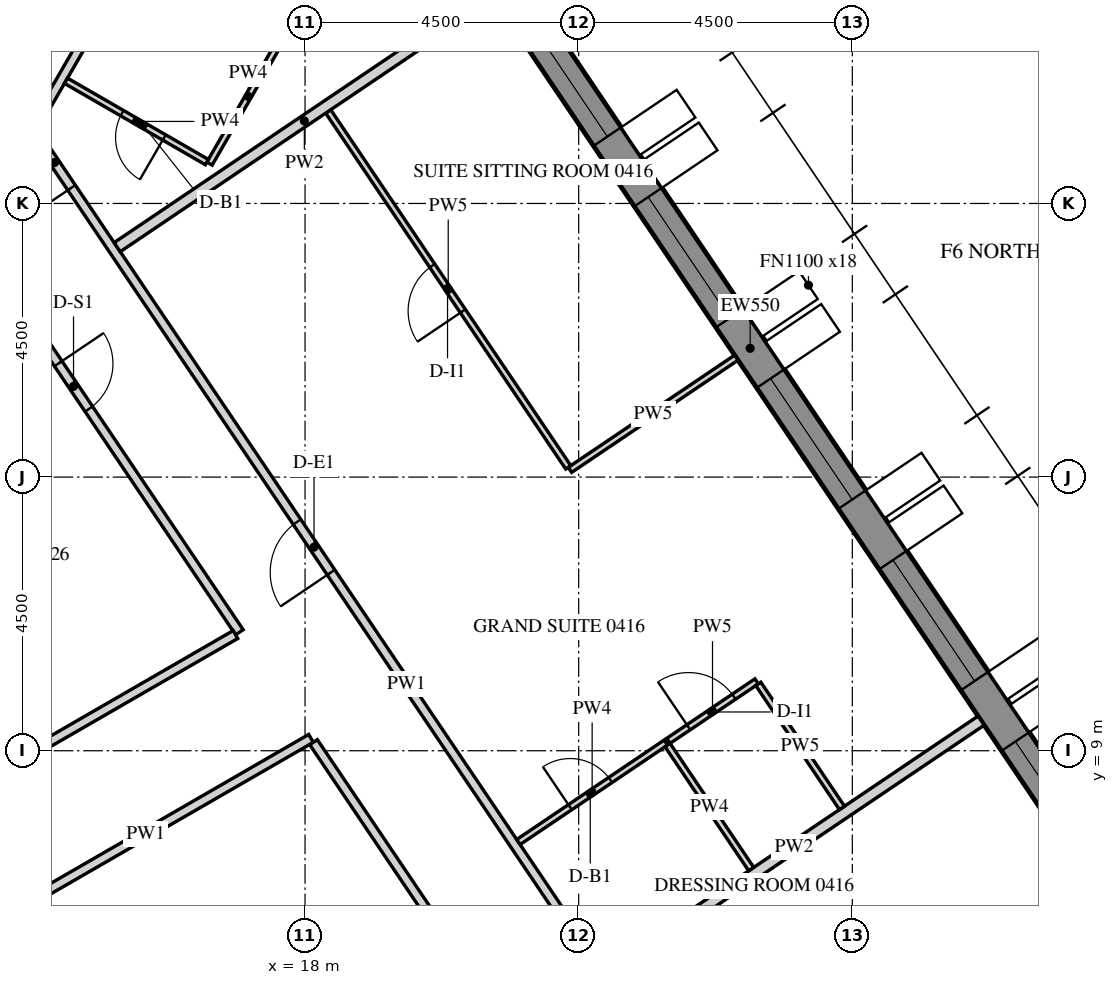
"""IFC4 building model, lengths in metres.
Left out: names, types, materials, properties, quantities, classifications, styles, units other than length and angle.
Written with IfcOpenShell. Run it as: python <this file> out.ifc"""

import sys

from ifc_helpers import new_model, si_unit, direction, frame, frame_2d, origin, place, context, subcontext, project, spatial, polyline, rectangle, outline, extrude, element, fill, save


model = new_model("IFC4")
c1 = context("Model", 3, precision=1e-05, world=origin(), true_north=direction((0.0, 1.0)))
c2 = subcontext(c1, "Body", "Model", "MODEL_VIEW")
j1 = project(units=[si_unit("LENGTHUNIT", "METRE"), si_unit("PLANEANGLEUNIT", "RADIAN")], contexts=[c1])
p1 = place(None, origin())
s1 = spatial("IfcSite", under=j1, at=p1, CompositionType="ELEMENT")
p2 = place(p1, origin())
s2 = spatial("IfcBuilding", under=s1, at=p2, CompositionType="ELEMENT")
p3 = place(p2, frame((0.0, 0.0, 68.7)))
s3 = spatial("IfcBuildingStorey", under=s2, at=p3, CompositionType="ELEMENT", Elevation=68.7)
p4 = place(p3, frame((33.728, 3.153, -0.15), z_axis=(0.0, 0.0, 1.0), x_axis=(-0.559192411416, 0.82903790445, 0.0)))
e1 = element("IfcWall", 1, at=p4, inside=s3, PredefinedType="SOLIDWALL", context=c2, shape_type="SweptSolid", body=[
    extrude(outline(polyline([(-0.026, -0.275), (30.093, -0.275), (30.048, 0.275), (0.026, 0.275), (-0.026, -0.275)])), origin(), (0.0, 0.0, 1.0), 3.9),
])
p5 = place(p4, frame((1.236, 0.0, 1.05)))
e2 = element("IfcOpeningElement", 2, at=p5, cuts=e1, PredefinedType="OPENING", context=c2, shape_type="SweptSolid", body=[
    extrude(rectangle(XDim=2.4, YDim=2.4, at=frame_2d((1.2, 1.2))), frame((0.0, 0.285, 0.0), z_axis=(0.0, -1.0, 0.0), x_axis=(1.0, 0.0, 0.0)), (0.0, 0.0, 1.0), 0.57),
])
p6 = place(p4, frame((4.835, 0.0, 1.05)))
e3 = element("IfcOpeningElement", 3, at=p6, cuts=e1, PredefinedType="OPENING", context=c2, shape_type="SweptSolid", body=[
    extrude(rectangle(XDim=2.4, YDim=2.4, at=frame_2d((1.2, 1.2))), frame((0.0, 0.285, 0.0), z_axis=(0.0, -1.0, 0.0), x_axis=(1.0, 0.0, 0.0)), (0.0, 0.0, 1.0), 0.57),
])
p7 = place(p4, frame((8.436, 0.0, 1.05)))
e4 = element("IfcOpeningElement", 4, at=p7, cuts=e1, PredefinedType="OPENING", context=c2, shape_type="SweptSolid", body=[
    extrude(rectangle(XDim=2.4, YDim=2.4, at=frame_2d((1.2, 1.2))), frame((0.0, 0.285, 0.0), z_axis=(0.0, -1.0, 0.0), x_axis=(1.0, 0.0, 0.0)), (0.0, 0.0, 1.0), 0.57),
])
p8 = place(p4, frame((12.035, 0.0, 1.05)))
e5 = element("IfcOpeningElement", 5, at=p8, cuts=e1, PredefinedType="OPENING", context=c2, shape_type="SweptSolid", body=[
    extrude(rectangle(XDim=2.4, YDim=2.4, at=frame_2d((1.2, 1.2))), frame((0.0, 0.285, 0.0), z_axis=(0.0, -1.0, 0.0), x_axis=(1.0, 0.0, 0.0)), (0.0, 0.0, 1.0), 0.57),
])
p9 = place(p4, frame((15.635, 0.0, 1.05)))
e6 = element("IfcOpeningElement", 6, at=p9, cuts=e1, PredefinedType="OPENING", context=c2, shape_type="SweptSolid", body=[
    extrude(rectangle(XDim=2.4, YDim=2.4, at=frame_2d((1.2, 1.2))), frame((0.0, 0.285, 0.0), z_axis=(0.0, -1.0, 0.0), x_axis=(1.0, 0.0, 0.0)), (0.0, 0.0, 1.0), 0.57),
])
p10 = place(p4, frame((19.236, 0.0, 1.05)))
e7 = element("IfcOpeningElement", 7, at=p10, cuts=e1, PredefinedType="OPENING", context=c2, shape_type="SweptSolid", body=[
    extrude(rectangle(XDim=2.4, YDim=2.4, at=frame_2d((1.2, 1.2))), frame((0.0, 0.285, 0.0), z_axis=(0.0, -1.0, 0.0), x_axis=(1.0, 0.0, 0.0)), (0.0, 0.0, 1.0), 0.57),
])
p11 = place(p4, frame((22.835, 0.0, 1.05)))
e8 = element("IfcOpeningElement", 8, at=p11, cuts=e1, PredefinedType="OPENING", context=c2, shape_type="SweptSolid", body=[
    extrude(rectangle(XDim=2.4, YDim=2.4, at=frame_2d((1.2, 1.2))), frame((0.0, 0.285, 0.0), z_axis=(0.0, -1.0, 0.0), x_axis=(1.0, 0.0, 0.0)), (0.0, 0.0, 1.0), 0.57),
])
p12 = place(p4, frame((26.436, 0.0, 1.05)))
e9 = element("IfcOpeningElement", 9, at=p12, cuts=e1, PredefinedType="OPENING", context=c2, shape_type="SweptSolid", body=[
    extrude(rectangle(XDim=2.4, YDim=2.4, at=frame_2d((1.2, 1.2))), frame((0.0, 0.285, 0.0), z_axis=(0.0, -1.0, 0.0), x_axis=(1.0, 0.0, 0.0)), (0.0, 0.0, 1.0), 0.57),
])
p13 = place(p3, frame((15.819, 0.0, -0.15), z_axis=(0.0, 0.0, 1.0), x_axis=(-0.499999880136, 0.866025472988, 0.0)))
e10 = element("IfcWall", 10, at=p13, inside=s3, PredefinedType="SHEAR", context=c2, shape_type="SweptSolid", body=[
    extrude(outline(polyline([(-0.173, -0.3), (15.993, -0.3), (15.646, 0.3), (0.173, 0.3), (-0.173, -0.3)])), origin(), (0.0, 0.0, 1.0), 3.9),
])
p14 = place(p13, frame((6.981, 0.0, 0.15)))
e11 = element("IfcOpeningElement", 11, at=p14, cuts=e10, PredefinedType="OPENING", context=c2, shape_type="SweptSolid", body=[
    extrude(rectangle(XDim=1.8, YDim=2.4, at=frame_2d((0.9, 1.2))), frame((0.0, 0.31, 0.0), z_axis=(0.0, -1.0, 0.0), x_axis=(1.0, 0.0, 0.0)), (0.0, 0.0, 1.0), 0.62),
])
p15 = place(p3, frame((8.083, 14.0, -0.15), z_axis=(0.0, 0.0, 1.0), x_axis=(0.499997680643, 0.866026742862, 0.0)))
e12 = element("IfcWall", 12, at=p15, inside=s3, PredefinedType="SHEAR", context=c2, shape_type="SweptSolid", body=[
    extrude(rectangle(XDim=16.509, YDim=0.6, at=frame_2d((8.254, 0.0))), origin(), (0.0, 0.0, 1.0), 3.9),
])
p16 = place(p15, frame((7.354, 0.0, 0.15)))
e13 = element("IfcOpeningElement", 13, at=p16, cuts=e12, PredefinedType="OPENING", context=c2, shape_type="SweptSolid", body=[
    extrude(rectangle(XDim=1.8, YDim=2.4, at=frame_2d((0.9, 1.2))), frame((0.0, 0.31, 0.0), z_axis=(0.0, -1.0, 0.0), x_axis=(1.0, 0.0, 0.0)), (0.0, 0.0, 1.0), 0.62),
])
p17 = place(p3, frame((25.821, 0.972, 0.0), z_axis=(0.0, 0.0, 1.0), x_axis=(-0.559193816298, 0.829036956845, 0.0)))
e14 = element("IfcWall", 14, at=p17, inside=s3, PredefinedType="PARTITIONING", context=c2, shape_type="SweptSolid", body=[
    extrude(rectangle(XDim=22.002, YDim=0.15, at=frame_2d((11.001, 0.0))), origin(), (0.0, 0.0, 1.0), 2.988),
])
p18 = place(p17, frame((3.269, 0.0, 0.0)))
e15 = element("IfcOpeningElement", 15, at=p18, cuts=e14, PredefinedType="OPENING", context=c2, shape_type="SweptSolid", body=[
    extrude(rectangle(XDim=1.0, YDim=2.1, at=frame_2d((0.5, 1.05))), frame((0.0, 0.085, 0.0), z_axis=(0.0, -1.0, 0.0), x_axis=(1.0, 0.0, 0.0)), (0.0, 0.0, 1.0), 0.17),
])
p19 = place(p17, frame((13.221, 0.0, 0.0)))
e16 = element("IfcOpeningElement", 16, at=p19, cuts=e14, PredefinedType="OPENING", context=c2, shape_type="SweptSolid", body=[
    extrude(rectangle(XDim=1.0, YDim=2.1, at=frame_2d((0.5, 1.05))), frame((0.0, 0.085, 0.0), z_axis=(0.0, -1.0, 0.0), x_axis=(1.0, 0.0, 0.0)), (0.0, 0.0, 1.0), 0.17),
])
p20 = place(p17, frame((20.852, 0.0, 0.0)))
e17 = element("IfcOpeningElement", 17, at=p20, cuts=e14, PredefinedType="OPENING", context=c2, shape_type="SweptSolid", body=[
    extrude(rectangle(XDim=1.0, YDim=2.1, at=frame_2d((0.5, 1.05))), frame((0.0, 0.085, 0.0), z_axis=(0.0, -1.0, 0.0), x_axis=(1.0, 0.0, 0.0)), (0.0, 0.0, 1.0), 0.17),
])
p21 = place(p3, frame((13.559, 19.285, 0.0), z_axis=(0.0, 0.0, 1.0), x_axis=(0.499975646431, 0.866039463868, 0.0)))
e18 = element("IfcWall", 18, at=p21, inside=s3, PredefinedType="PARTITIONING", context=c2, shape_type="SweptSolid", body=[
    extrude(rectangle(XDim=3.84, YDim=0.15, at=frame_2d((1.92, 0.0))), origin(), (0.0, 0.0, 1.0), 2.988),
])
p22 = place(p3, frame((12.664, 6.066, 0.0), z_axis=(0.0, 0.0, 1.0), x_axis=(0.866036561919, 0.499980673046, 0.0)))
e19 = element("IfcWall", 19, at=p22, inside=s3, PredefinedType="PARTITIONING", context=c2, shape_type="SweptSolid", body=[
    extrude(rectangle(XDim=6.275, YDim=0.15, at=frame_2d((3.137, 0.0))), origin(), (0.0, 0.0, 1.0), 2.988),
])
p23 = place(p3, frame((18.14, 9.141, 0.0), z_axis=(0.0, 0.0, 1.0), x_axis=(0.55918799196, -0.829040885389, 0.0)))
e20 = element("IfcWall", 20, at=p23, inside=s3, PredefinedType="PARTITIONING", context=c2, shape_type="SweptSolid", body=[
    extrude(rectangle(XDim=10.025, YDim=0.15, at=frame_2d((5.013, 0.0))), origin(), (0.0, 0.0, 1.0), 2.988),
])
p24 = place(p3, frame((11.465, 19.037, 0.0), z_axis=(0.0, 0.0, 1.0), x_axis=(0.559196064773, -0.829035440221, 0.0)))
e21 = element("IfcWall", 21, at=p24, inside=s3, PredefinedType="PARTITIONING", context=c2, shape_type="SweptSolid", body=[
    extrude(rectangle(XDim=9.757, YDim=0.15, at=frame_2d((4.878, 0.0))), origin(), (0.0, 0.0, 1.0), 2.988),
])
p25 = place(p24, frame((4.428, 0.0, 0.0)))
e22 = element("IfcOpeningElement", 22, at=p25, cuts=e21, PredefinedType="OPENING", context=c2, shape_type="SweptSolid", body=[
    extrude(rectangle(XDim=0.9, YDim=2.1, at=frame_2d((0.45, 1.05))), frame((0.0, 0.085, 0.0), z_axis=(0.0, -1.0, 0.0), x_axis=(1.0, 0.0, 0.0)), (0.0, 0.0, 1.0), 0.17),
])
p26 = place(p3, frame((16.855, 10.911, 0.0), z_axis=(0.0, 0.0, 1.0), x_axis=(-0.866020343444, -0.500008764664, 0.0)))
e23 = element("IfcWall", 23, at=p26, inside=s3, PredefinedType="PARTITIONING", context=c2, shape_type="SweptSolid", body=[
    extrude(rectangle(XDim=6.053, YDim=0.15, at=frame_2d((3.026, 0.0))), origin(), (0.0, 0.0, 1.0), 2.988),
])
p27 = place(p3, frame((29.119, 9.495, 0.0), z_axis=(0.0, 0.0, 1.0), x_axis=(-0.829038452737, -0.559191598545, 0.0)))
e24 = element("IfcWall", 24, at=p27, inside=s3, PredefinedType="PARTITIONING", context=c2, shape_type="SweptSolid", body=[
    extrude(rectangle(XDim=7.425, YDim=0.18, at=frame_2d((3.713, 0.0))), origin(), (0.0, 0.0, 1.0), 2.988),
])
p28 = place(p3, frame((21.509, 7.499, 0.0), z_axis=(0.0, 0.0, 1.0), x_axis=(0.829033436212, 0.559199035802, 0.0)))
e25 = element("IfcWall", 25, at=p28, inside=s3, PredefinedType="PARTITIONING", context=c2, shape_type="SweptSolid", body=[
    extrude(rectangle(XDim=2.925, YDim=0.1, at=frame_2d((1.462, 0.0))), origin(), (0.0, 0.0, 1.0), 2.988),
])
p29 = place(p28, frame((1.025, 0.0, 0.0)))
e26 = element("IfcOpeningElement", 26, at=p29, cuts=e25, PredefinedType="OPENING", context=c2, shape_type="SweptSolid", body=[
    extrude(rectangle(XDim=0.8, YDim=2.1, at=frame_2d((0.4, 1.05))), frame((0.0, 0.06, 0.0), z_axis=(0.0, -1.0, 0.0), x_axis=(1.0, 0.0, 0.0)), (0.0, 0.0, 1.0), 0.12),
])
p30 = place(p3, frame((23.975, 9.162, 0.0), z_axis=(0.0, 0.0, 1.0), x_axis=(0.829011970545, 0.559230858138, 0.0)))
e27 = element("IfcWall", 27, at=p30, inside=s3, PredefinedType="PARTITIONING", context=c2, shape_type="SweptSolid", body=[
    extrude(rectangle(XDim=1.75, YDim=0.1, at=frame_2d((0.875, 0.0))), origin(), (0.0, 0.0, 1.0), 2.988),
])
p31 = place(p30, frame((0.4, 0.0, 0.0)))
e28 = element("IfcOpeningElement", 28, at=p31, cuts=e27, PredefinedType="OPENING", context=c2, shape_type="SweptSolid", body=[
    extrude(rectangle(XDim=0.9, YDim=2.1, at=frame_2d((0.45, 1.05))), frame((0.0, 0.06, 0.0), z_axis=(0.0, -1.0, 0.0), x_axis=(1.0, 0.0, 0.0)), (0.0, 0.0, 1.0), 0.12),
])
p32 = place(p3, frame((25.454, 10.099, 0.0), z_axis=(0.0, 0.0, 1.0), x_axis=(0.559135322609, -0.829076408427, 0.0)))
e29 = element("IfcWall", 29, at=p32, inside=s3, PredefinedType="PARTITIONING", context=c2, shape_type="SweptSolid", body=[
    extrude(rectangle(XDim=2.46, YDim=0.1, at=frame_2d((1.23, 0.0))), origin(), (0.0, 0.0, 1.0), 2.988),
])
p33 = place(p3, frame((25.092, 15.464, 0.0), z_axis=(0.0, 0.0, 1.0), x_axis=(-0.829033042551, -0.55919961942, 0.0)))
e30 = element("IfcWall", 30, at=p33, inside=s3, PredefinedType="PARTITIONING", context=c2, shape_type="SweptSolid", body=[
    extrude(rectangle(XDim=3.3, YDim=0.1, at=frame_2d((1.65, 0.0))), origin(), (0.0, 0.0, 1.0), 2.988),
])
p34 = place(p3, frame((22.329, 13.66, 0.0), z_axis=(0.0, 0.0, 1.0), x_axis=(-0.559216845309, 0.829021423078, 0.0)))
e31 = element("IfcWall", 31, at=p34, inside=s3, PredefinedType="PARTITIONING", context=c2, shape_type="SweptSolid", body=[
    extrude(rectangle(XDim=7.06, YDim=0.1, at=frame_2d((3.53, 0.0))), origin(), (0.0, 0.0, 1.0), 2.988),
])
p35 = place(p34, frame((3.1, 0.0, 0.0)))
e32 = element("IfcOpeningElement", 32, at=p35, cuts=e31, PredefinedType="OPENING", context=c2, shape_type="SweptSolid", body=[
    extrude(rectangle(XDim=0.9, YDim=2.1, at=frame_2d((0.45, 1.05))), frame((0.0, 0.06, 0.0), z_axis=(0.0, -1.0, 0.0), x_axis=(1.0, 0.0, 0.0)), (0.0, 0.0, 1.0), 0.12),
])
p36 = place(p3, frame((21.066, 21.433, 0.0), z_axis=(0.0, 0.0, 1.0), x_axis=(-0.829028170871, -0.559206841788, 0.0)))
e33 = element("IfcWall", 33, at=p36, inside=s3, PredefinedType="PARTITIONING", context=c2, shape_type="SweptSolid", body=[
    extrude(rectangle(XDim=7.425, YDim=0.18, at=frame_2d((3.712, 0.0))), origin(), (0.0, 0.0, 1.0), 2.988),
])
p37 = place(p3, frame((25.338, 7.053, 0.0), z_axis=(0.0, 0.0, 1.0), x_axis=(-0.559249542518, 0.82899936622, 0.0)))
e34 = element("IfcWall", 34, at=p37, inside=s3, PredefinedType="PARTITIONING", context=c2, shape_type="SweptSolid", body=[
    extrude(rectangle(XDim=2.46, YDim=0.1, at=frame_2d((1.23, 0.0))), origin(), (0.0, 0.0, 1.0), 2.988),
])
p38 = place(p3, frame((17.704, 20.864, 0.0), z_axis=(0.0, 0.0, 1.0), x_axis=(-0.499948979701, -0.866054858364, 0.0)))
e35 = element("IfcWall", 35, at=p38, inside=s3, PredefinedType="PARTITIONING", context=c2, shape_type="SweptSolid", body=[
    extrude(rectangle(XDim=2.55, YDim=0.1, at=frame_2d((1.275, 0.0))), origin(), (0.0, 0.0, 1.0), 2.988),
])
p39 = place(p3, frame((16.385, 18.68, 0.0), z_axis=(0.0, 0.0, 1.0), x_axis=(-0.86604424267, 0.499967368674, 0.0)))
e36 = element("IfcWall", 36, at=p39, inside=s3, PredefinedType="PARTITIONING", context=c2, shape_type="SweptSolid", body=[
    extrude(rectangle(XDim=2.675, YDim=0.1, at=frame_2d((1.337, 0.0))), origin(), (0.0, 0.0, 1.0), 2.988),
])
p40 = place(p39, frame((0.81, 0.0, 0.0)))
e37 = element("IfcOpeningElement", 37, at=p40, cuts=e36, PredefinedType="OPENING", context=c2, shape_type="SweptSolid", body=[
    extrude(rectangle(XDim=0.8, YDim=2.1, at=frame_2d((0.4, 1.05))), frame((0.0, 0.06, 0.0), z_axis=(0.0, -1.0, 0.0), x_axis=(1.0, 0.0, 0.0)), (0.0, 0.0, 1.0), 0.12),
])
p41 = place(p6, frame((0.0, 0.205, 0.0)))
e38 = element("IfcWindow", 38, at=p41, inside=s3, PartitioningType="DOUBLE_PANEL_VERTICAL", PredefinedType="WINDOW", context=c2, shape_type="SweptSolid", body=[
    extrude(rectangle(XDim=2.4, YDim=2.4, at=frame_2d((1.2, 1.2))), frame((0.0, 0.03, 0.0), z_axis=(0.0, -1.0, 0.0), x_axis=(1.0, 0.0, 0.0)), (0.0, 0.0, 1.0), 0.06),
])
fill(e3, e38)
p42 = place(p7, frame((0.0, 0.205, 0.0)))
e39 = element("IfcWindow", 39, at=p42, inside=s3, PartitioningType="DOUBLE_PANEL_VERTICAL", PredefinedType="WINDOW", context=c2, shape_type="SweptSolid", body=[
    extrude(rectangle(XDim=2.4, YDim=2.4, at=frame_2d((1.2, 1.2))), frame((0.0, 0.03, 0.0), z_axis=(0.0, -1.0, 0.0), x_axis=(1.0, 0.0, 0.0)), (0.0, 0.0, 1.0), 0.06),
])
fill(e4, e39)
p43 = place(p8, frame((0.0, 0.205, 0.0)))
e40 = element("IfcWindow", 40, at=p43, inside=s3, PartitioningType="DOUBLE_PANEL_VERTICAL", PredefinedType="WINDOW", context=c2, shape_type="SweptSolid", body=[
    extrude(rectangle(XDim=2.4, YDim=2.4, at=frame_2d((1.2, 1.2))), frame((0.0, 0.03, 0.0), z_axis=(0.0, -1.0, 0.0), x_axis=(1.0, 0.0, 0.0)), (0.0, 0.0, 1.0), 0.06),
])
fill(e5, e40)
p44 = place(p9, frame((0.0, 0.205, 0.0)))
e41 = element("IfcWindow", 41, at=p44, inside=s3, PartitioningType="DOUBLE_PANEL_VERTICAL", PredefinedType="WINDOW", context=c2, shape_type="SweptSolid", body=[
    extrude(rectangle(XDim=2.4, YDim=2.4, at=frame_2d((1.2, 1.2))), frame((0.0, 0.03, 0.0), z_axis=(0.0, -1.0, 0.0), x_axis=(1.0, 0.0, 0.0)), (0.0, 0.0, 1.0), 0.06),
])
fill(e6, e41)
p45 = place(p10, frame((0.0, 0.205, 0.0)))
e42 = element("IfcWindow", 42, at=p45, inside=s3, PartitioningType="DOUBLE_PANEL_VERTICAL", PredefinedType="WINDOW", context=c2, shape_type="SweptSolid", body=[
    extrude(rectangle(XDim=2.4, YDim=2.4, at=frame_2d((1.2, 1.2))), frame((0.0, 0.03, 0.0), z_axis=(0.0, -1.0, 0.0), x_axis=(1.0, 0.0, 0.0)), (0.0, 0.0, 1.0), 0.06),
])
fill(e7, e42)
p46 = place(p19, origin())
e43 = element("IfcDoor", 43, at=p46, inside=s3, OperationType="SINGLE_SWING_LEFT", PredefinedType="DOOR", context=c2, shape_type="SweptSolid", body=[
    extrude(rectangle(XDim=1.0, YDim=2.1, at=frame_2d((0.5, 1.05))), frame((0.0, 0.025, 0.0), z_axis=(0.0, -1.0, 0.0), x_axis=(1.0, 0.0, 0.0)), (0.0, 0.0, 1.0), 0.05),
])
fill(e16, e43)
p47 = place(p29, origin())
e44 = element("IfcDoor", 44, at=p47, inside=s3, OperationType="SINGLE_SWING_RIGHT", PredefinedType="DOOR", context=c2, shape_type="SweptSolid", body=[
    extrude(rectangle(XDim=0.8, YDim=2.1, at=frame_2d((0.4, 1.05))), frame((0.0, 0.025, 0.0), z_axis=(0.0, -1.0, 0.0), x_axis=(1.0, 0.0, 0.0)), (0.0, 0.0, 1.0), 0.05),
])
fill(e26, e44)
p48 = place(p31, origin())
e45 = element("IfcDoor", 45, at=p48, inside=s3, OperationType="SINGLE_SWING_LEFT", PredefinedType="DOOR", context=c2, shape_type="SweptSolid", body=[
    extrude(rectangle(XDim=0.9, YDim=2.1, at=frame_2d((0.45, 1.05))), frame((0.0, 0.025, 0.0), z_axis=(0.0, -1.0, 0.0), x_axis=(1.0, 0.0, 0.0)), (0.0, 0.0, 1.0), 0.05),
])
fill(e28, e45)
p49 = place(p35, origin())
e46 = element("IfcDoor", 46, at=p49, inside=s3, OperationType="SINGLE_SWING_RIGHT", PredefinedType="DOOR", context=c2, shape_type="SweptSolid", body=[
    extrude(rectangle(XDim=0.9, YDim=2.1, at=frame_2d((0.45, 1.05))), frame((0.0, 0.025, 0.0), z_axis=(0.0, -1.0, 0.0), x_axis=(1.0, 0.0, 0.0)), (0.0, 0.0, 1.0), 0.05),
])
fill(e32, e46)
p50 = place(p20, origin())
e47 = element("IfcDoor", 47, at=p50, inside=s3, OperationType="SINGLE_SWING_LEFT", PredefinedType="DOOR", context=c2, shape_type="SweptSolid", body=[
    extrude(rectangle(XDim=1.0, YDim=2.1, at=frame_2d((0.5, 1.05))), frame((0.0, 0.025, 0.0), z_axis=(0.0, -1.0, 0.0), x_axis=(1.0, 0.0, 0.0)), (0.0, 0.0, 1.0), 0.05),
])
fill(e17, e47)
p51 = place(p40, origin())
e48 = element("IfcDoor", 48, at=p51, inside=s3, OperationType="SINGLE_SWING_RIGHT", PredefinedType="DOOR", context=c2, shape_type="SweptSolid", body=[
    extrude(rectangle(XDim=0.8, YDim=2.1, at=frame_2d((0.4, 1.05))), frame((0.0, 0.025, 0.0), z_axis=(0.0, -1.0, 0.0), x_axis=(1.0, 0.0, 0.0)), (0.0, 0.0, 1.0), 0.05),
])
fill(e37, e48)
p52 = place(p25, origin())
e49 = element("IfcDoor", 49, at=p52, inside=s3, OperationType="SINGLE_SWING_RIGHT", PredefinedType="DOOR", context=c2, shape_type="SweptSolid", body=[
    extrude(rectangle(XDim=0.9, YDim=2.1, at=frame_2d((0.45, 1.05))), frame((0.0, 0.025, 0.0), z_axis=(0.0, -1.0, 0.0), x_axis=(1.0, 0.0, 0.0)), (0.0, 0.0, 1.0), 0.05),
])
fill(e22, e49)
save(model, sys.argv[1])
